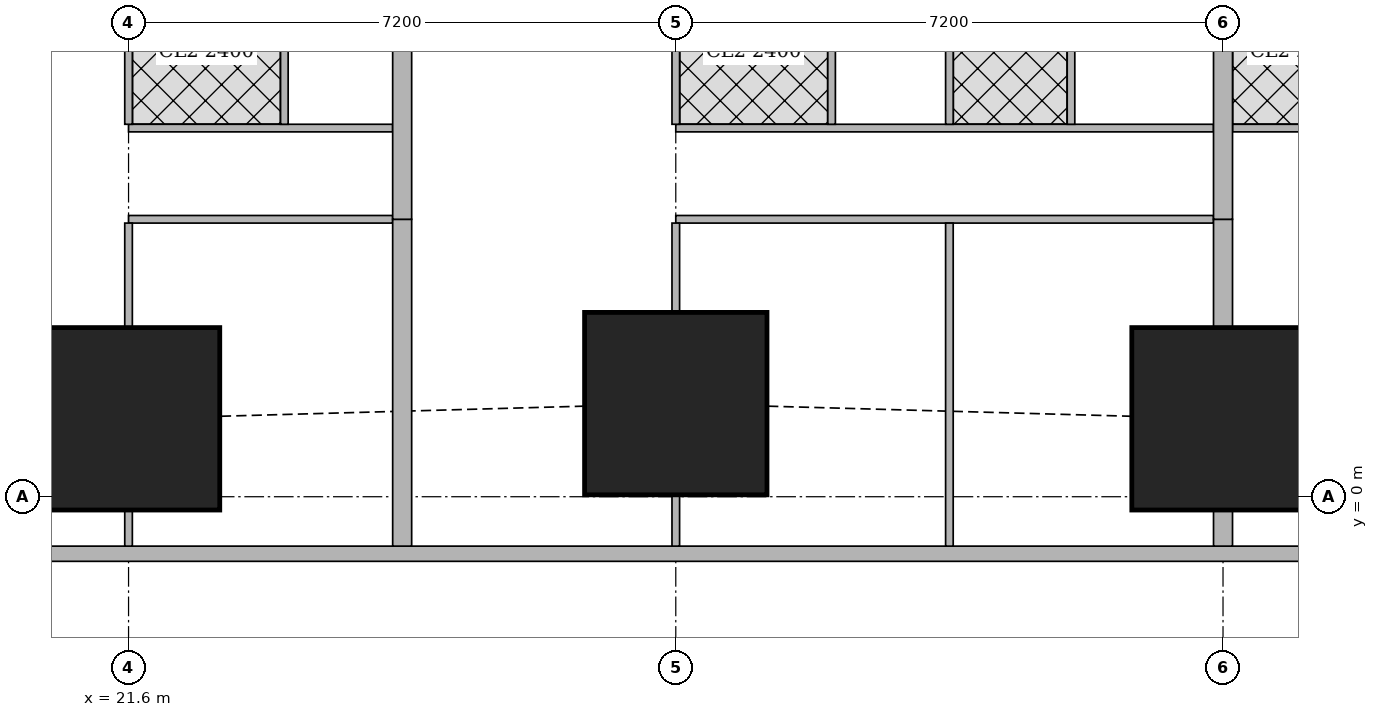
"""IFC4 building model, lengths in metres.
Left out: names, types, materials, properties, quantities, classifications, styles, units other than length and angle.
Written with IfcOpenShell. Run it as: python <this file> out.ifc"""

import sys

from ifc_helpers import new_model, si_unit, direction, frame, frame_2d, origin, origin_2d, place, context, subcontext, project, spatial, rectangle, extrude, element, fill, save


model = new_model("IFC4")
c1 = context("Model", 3, precision=1e-05, world=origin(), true_north=direction((0.0, 1.0)))
c2 = subcontext(c1, "Body", "Model", "MODEL_VIEW")
j1 = project(units=[si_unit("LENGTHUNIT", "METRE"), si_unit("PLANEANGLEUNIT", "RADIAN")], contexts=[c1])
p1 = place(None, origin())
s1 = spatial("IfcSite", under=j1, at=p1, CompositionType="ELEMENT")
p2 = place(p1, origin())
s2 = spatial("IfcBuilding", under=s1, at=p2, CompositionType="ELEMENT")
p3 = place(p2, frame((0.0, 0.0, 204.95)))
s3 = spatial("IfcBuildingStorey", under=s2, at=p3, CompositionType="ELEMENT", Elevation=204.95)
for number, where, z_axis, x_axis in (
    (1, (21.6, 1.025, 0.0), (0.0, 0.0, 1.0), (1.0, 0.0, 0.0)),
    (2, (28.8, 1.225, 0.0), (0.0, 0.0, 1.0), (1.0, 0.0, 0.0)),
    (3, (36.0, 1.025, 0.0), (0.0, 0.0, 1.0), (1.0, 0.0, 0.0)),
):
    element("IfcColumn", number, at=place(p3, frame(where, z_axis=z_axis, x_axis=x_axis)), inside=s3, PredefinedType="COLUMN", context=c2, shape_type="SweptSolid", body=[
        extrude(rectangle(XDim=2.4, YDim=2.4, at=origin_2d()), origin(), (0.0, 0.0, 1.0), 3.75),
    ])
p4 = place(p3, frame((7.363, -0.75, 0.0), z_axis=(0.0, 0.0, 1.0), x_axis=(1.0, 0.0, 0.0)))
e4 = element("IfcWall", 4, at=p4, inside=s3, PredefinedType="SOLIDWALL", context=c2, shape_type="SweptSolid", body=[
    extrude(rectangle(XDim=40.428, YDim=0.2, at=frame_2d((20.214, 0.0))), origin(), (0.0, 0.0, 1.0), 3.5),
])
p5 = place(p4, frame((2.319, 0.0, 0.9)))
e5 = element("IfcOpeningElement", 5, at=p5, cuts=e4, PredefinedType="OPENING", context=c2, shape_type="SweptSolid", body=[
    extrude(rectangle(XDim=2.4, YDim=1.5, at=frame_2d((1.2, 0.75))), frame((0.0, 0.11, 0.0), z_axis=(0.0, -1.0, 0.0), x_axis=(1.0, 0.0, 0.0)), (0.0, 0.0, 1.0), 0.22),
])
p6 = place(p4, frame((7.937, 0.0, 0.9)))
e6 = element("IfcOpeningElement", 6, at=p6, cuts=e4, PredefinedType="OPENING", context=c2, shape_type="SweptSolid", body=[
    extrude(rectangle(XDim=1.8, YDim=1.5, at=frame_2d((0.9, 0.75))), frame((0.0, 0.11, 0.0), z_axis=(0.0, -1.0, 0.0), x_axis=(1.0, 0.0, 0.0)), (0.0, 0.0, 1.0), 0.22),
])
p7 = place(p4, frame((11.537, 0.0, 0.9)))
e7 = element("IfcOpeningElement", 7, at=p7, cuts=e4, PredefinedType="OPENING", context=c2, shape_type="SweptSolid", body=[
    extrude(rectangle(XDim=1.8, YDim=1.5, at=frame_2d((0.9, 0.75))), frame((0.0, 0.11, 0.0), z_axis=(0.0, -1.0, 0.0), x_axis=(1.0, 0.0, 0.0)), (0.0, 0.0, 1.0), 0.22),
])
p8 = place(p4, frame((15.137, 0.0, 0.9)))
e8 = element("IfcOpeningElement", 8, at=p8, cuts=e4, PredefinedType="OPENING", context=c2, shape_type="SweptSolid", body=[
    extrude(rectangle(XDim=1.8, YDim=1.5, at=frame_2d((0.9, 0.75))), frame((0.0, 0.11, 0.0), z_axis=(0.0, -1.0, 0.0), x_axis=(1.0, 0.0, 0.0)), (0.0, 0.0, 1.0), 0.22),
])
p9 = place(p4, frame((18.737, 0.0, 0.9)))
e9 = element("IfcOpeningElement", 9, at=p9, cuts=e4, PredefinedType="OPENING", context=c2, shape_type="SweptSolid", body=[
    extrude(rectangle(XDim=1.8, YDim=1.5, at=frame_2d((0.9, 0.75))), frame((0.0, 0.11, 0.0), z_axis=(0.0, -1.0, 0.0), x_axis=(1.0, 0.0, 0.0)), (0.0, 0.0, 1.0), 0.22),
])
p10 = place(p4, frame((22.337, 0.0, 0.9)))
e10 = element("IfcOpeningElement", 10, at=p10, cuts=e4, PredefinedType="OPENING", context=c2, shape_type="SweptSolid", body=[
    extrude(rectangle(XDim=1.8, YDim=1.5, at=frame_2d((0.9, 0.75))), frame((0.0, 0.11, 0.0), z_axis=(0.0, -1.0, 0.0), x_axis=(1.0, 0.0, 0.0)), (0.0, 0.0, 1.0), 0.22),
])
p11 = place(p4, frame((25.937, 0.0, 0.9)))
e11 = element("IfcOpeningElement", 11, at=p11, cuts=e4, PredefinedType="OPENING", context=c2, shape_type="SweptSolid", body=[
    extrude(rectangle(XDim=1.8, YDim=1.5, at=frame_2d((0.9, 0.75))), frame((0.0, 0.11, 0.0), z_axis=(0.0, -1.0, 0.0), x_axis=(1.0, 0.0, 0.0)), (0.0, 0.0, 1.0), 0.22),
])
p12 = place(p4, frame((29.537, 0.0, 0.9)))
e12 = element("IfcOpeningElement", 12, at=p12, cuts=e4, PredefinedType="OPENING", context=c2, shape_type="SweptSolid", body=[
    extrude(rectangle(XDim=1.8, YDim=1.5, at=frame_2d((0.9, 0.75))), frame((0.0, 0.11, 0.0), z_axis=(0.0, -1.0, 0.0), x_axis=(1.0, 0.0, 0.0)), (0.0, 0.0, 1.0), 0.22),
])
p13 = place(p3, frame((33.68, 42.723, 0.0), z_axis=(0.0, 0.0, 1.0), x_axis=(0.185601160014, -0.982625162207, 0.0)))
e13 = element("IfcWall", 13, at=p13, inside=s3, PredefinedType="SOLIDWALL", context=c2, shape_type="SweptSolid", body=[
    extrude(rectangle(XDim=41.051, YDim=0.15, at=frame_2d((20.526, 0.0))), origin(), (0.0, 0.0, 1.0), 2.5),
])
p14 = place(p13, frame((12.307, 0.0, 0.0)))
e14 = element("IfcOpeningElement", 14, at=p14, cuts=e13, PredefinedType="OPENING", context=c2, shape_type="SweptSolid", body=[
    extrude(rectangle(XDim=1.0, YDim=2.1, at=frame_2d((0.5, 1.05))), frame((0.0, 0.085, 0.0), z_axis=(0.0, -1.0, 0.0), x_axis=(1.0, 0.0, 0.0)), (0.0, 0.0, 1.0), 0.17),
])
p15 = place(p13, frame((16.123, 0.0, 0.0)))
e15 = element("IfcOpeningElement", 15, at=p15, cuts=e13, PredefinedType="OPENING", context=c2, shape_type="SweptSolid", body=[
    extrude(rectangle(XDim=1.0, YDim=2.1, at=frame_2d((0.5, 1.05))), frame((0.0, 0.085, 0.0), z_axis=(0.0, -1.0, 0.0), x_axis=(1.0, 0.0, 0.0)), (0.0, 0.0, 1.0), 0.17),
])
p16 = place(p13, frame((30.902, 0.0, 0.0)))
e16 = element("IfcOpeningElement", 16, at=p16, cuts=e13, PredefinedType="OPENING", context=c2, shape_type="SweptSolid", body=[
    extrude(rectangle(XDim=1.0, YDim=2.1, at=frame_2d((0.5, 1.05))), frame((0.0, 0.085, 0.0), z_axis=(0.0, -1.0, 0.0), x_axis=(1.0, 0.0, 0.0)), (0.0, 0.0, 1.0), 0.17),
])
p17 = place(p3, frame((25.075, 3.65, 0.0), z_axis=(0.0, 0.0, 1.0), x_axis=(-1.0, 0.0, 0.0)))
e17 = element("IfcWall", 17, at=p17, inside=s3, PredefinedType="PARTITIONING", context=c2, shape_type="SweptSolid", body=[
    extrude(rectangle(XDim=3.475, YDim=0.1, at=frame_2d((1.737, 0.0))), origin(), (0.0, 0.0, 1.0), 3.5),
])
p18 = place(p17, frame((2.375, 0.0, 0.0)))
e18 = element("IfcOpeningElement", 18, at=p18, cuts=e17, PredefinedType="OPENING", context=c2, shape_type="SweptSolid", body=[
    extrude(rectangle(XDim=0.9, YDim=2.1, at=frame_2d((0.45, 1.05))), frame((0.0, 0.06, 0.0), z_axis=(0.0, -1.0, 0.0), x_axis=(1.0, 0.0, 0.0)), (0.0, 0.0, 1.0), 0.12),
])
p19 = place(p3, frame((25.075, 4.85, 0.0), z_axis=(0.0, 0.0, 1.0), x_axis=(-1.0, 0.0, 0.0)))
e19 = element("IfcWall", 19, at=p19, inside=s3, PredefinedType="PARTITIONING", context=c2, shape_type="SweptSolid", body=[
    extrude(rectangle(XDim=3.475, YDim=0.1, at=frame_2d((1.737, 0.0))), origin(), (0.0, 0.0, 1.0), 3.5),
])
p20 = place(p19, frame((2.0, 0.0, 0.0)))
e20 = element("IfcOpeningElement", 20, at=p20, cuts=e19, PredefinedType="OPENING", context=c2, shape_type="SweptSolid", body=[
    extrude(rectangle(XDim=0.9, YDim=2.1, at=frame_2d((0.45, 1.05))), frame((0.0, 0.06, 0.0), z_axis=(0.0, -1.0, 0.0), x_axis=(1.0, 0.0, 0.0)), (0.0, 0.0, 1.0), 0.12),
])
p21 = place(p19, frame((0.2, 0.0, 0.0)))
e21 = element("IfcOpeningElement", 21, at=p21, cuts=e19, PredefinedType="OPENING", context=c2, shape_type="SweptSolid", body=[
    extrude(rectangle(XDim=0.9, YDim=2.1, at=frame_2d((0.45, 1.05))), frame((0.0, 0.06, 0.0), z_axis=(0.0, -1.0, 0.0), x_axis=(1.0, 0.0, 0.0)), (0.0, 0.0, 1.0), 0.12),
])
p22 = place(p3, frame((21.6, -0.65, 0.0), z_axis=(0.0, 0.0, 1.0), x_axis=(0.0, 1.0, 0.0)))
e22 = element("IfcWall", 22, at=p22, inside=s3, PredefinedType="PARTITIONING", context=c2, shape_type="SweptSolid", body=[
    extrude(rectangle(XDim=0.474, YDim=0.1, at=frame_2d((0.237, 0.0))), origin(), (0.0, 0.0, 1.0), 3.5),
])
p23 = place(p3, frame((21.6, 2.226, 0.0), z_axis=(0.0, 0.0, 1.0), x_axis=(0.0, 1.0, 0.0)))
e23 = element("IfcWall", 23, at=p23, inside=s3, PredefinedType="PARTITIONING", context=c2, shape_type="SweptSolid", body=[
    extrude(rectangle(XDim=1.374, YDim=0.1, at=frame_2d((0.687, 0.0))), origin(), (0.0, 0.0, 1.0), 3.5),
])
p24 = place(p3, frame((21.6, 4.9, 0.0), z_axis=(0.0, 0.0, 1.0), x_axis=(0.0, 1.0, 0.0)))
e24 = element("IfcWall", 24, at=p24, inside=s3, PredefinedType="PARTITIONING", context=c2, shape_type="SweptSolid", body=[
    extrude(rectangle(XDim=1.899, YDim=0.1, at=frame_2d((0.95, 0.0))), origin(), (0.0, 0.0, 1.0), 3.5),
])
p25 = place(p3, frame((23.65, 4.9, 0.0), z_axis=(0.0, 0.0, 1.0), x_axis=(0.0, 1.0, 0.0)))
e25 = element("IfcWall", 25, at=p25, inside=s3, PredefinedType="PARTITIONING", context=c2, shape_type="SweptSolid", body=[
    extrude(rectangle(XDim=3.525, YDim=0.1, at=frame_2d((1.763, 0.0))), origin(), (0.0, 0.0, 1.0), 3.5),
])
p26 = place(p3, frame((35.875, 3.65, 0.0), z_axis=(0.0, 0.0, 1.0), x_axis=(-1.0, 0.0, 0.0)))
e26 = element("IfcWall", 26, at=p26, inside=s3, PredefinedType="PARTITIONING", context=c2, shape_type="SweptSolid", body=[
    extrude(rectangle(XDim=7.075, YDim=0.1, at=frame_2d((3.538, 0.0))), origin(), (0.0, 0.0, 1.0), 3.5),
])
p27 = place(p26, frame((4.95, 0.0, 0.0)))
e27 = element("IfcOpeningElement", 27, at=p27, cuts=e26, PredefinedType="OPENING", context=c2, shape_type="SweptSolid", body=[
    extrude(rectangle(XDim=0.9, YDim=2.1, at=frame_2d((0.45, 1.05))), frame((0.0, 0.06, 0.0), z_axis=(0.0, -1.0, 0.0), x_axis=(1.0, 0.0, 0.0)), (0.0, 0.0, 1.0), 0.12),
])
p28 = place(p26, frame((2.375, 0.0, 0.0)))
e28 = element("IfcOpeningElement", 28, at=p28, cuts=e26, PredefinedType="OPENING", context=c2, shape_type="SweptSolid", body=[
    extrude(rectangle(XDim=0.9, YDim=2.1, at=frame_2d((0.45, 1.05))), frame((0.0, 0.06, 0.0), z_axis=(0.0, -1.0, 0.0), x_axis=(1.0, 0.0, 0.0)), (0.0, 0.0, 1.0), 0.12),
])
p29 = place(p3, frame((35.875, 4.85, 0.0), z_axis=(0.0, 0.0, 1.0), x_axis=(-1.0, 0.0, 0.0)))
e29 = element("IfcWall", 29, at=p29, inside=s3, PredefinedType="PARTITIONING", context=c2, shape_type="SweptSolid", body=[
    extrude(rectangle(XDim=7.075, YDim=0.1, at=frame_2d((3.538, 0.0))), origin(), (0.0, 0.0, 1.0), 3.5),
])
p30 = place(p29, frame((5.6, 0.0, 0.0)))
e30 = element("IfcOpeningElement", 30, at=p30, cuts=e29, PredefinedType="OPENING", context=c2, shape_type="SweptSolid", body=[
    extrude(rectangle(XDim=0.9, YDim=2.1, at=frame_2d((0.45, 1.05))), frame((0.0, 0.06, 0.0), z_axis=(0.0, -1.0, 0.0), x_axis=(1.0, 0.0, 0.0)), (0.0, 0.0, 1.0), 0.12),
])
p31 = place(p29, frame((2.225, 0.0, 0.0)))
e31 = element("IfcOpeningElement", 31, at=p31, cuts=e29, PredefinedType="OPENING", context=c2, shape_type="SweptSolid", body=[
    extrude(rectangle(XDim=0.9, YDim=2.1, at=frame_2d((0.45, 1.05))), frame((0.0, 0.06, 0.0), z_axis=(0.0, -1.0, 0.0), x_axis=(1.0, 0.0, 0.0)), (0.0, 0.0, 1.0), 0.12),
])
p32 = place(p29, frame((3.8, 0.0, 0.0)))
e32 = element("IfcOpeningElement", 32, at=p32, cuts=e29, PredefinedType="OPENING", context=c2, shape_type="SweptSolid", body=[
    extrude(rectangle(XDim=0.9, YDim=2.1, at=frame_2d((0.45, 1.05))), frame((0.0, 0.06, 0.0), z_axis=(0.0, -1.0, 0.0), x_axis=(1.0, 0.0, 0.0)), (0.0, 0.0, 1.0), 0.12),
])
p33 = place(p29, frame((0.425, 0.0, 0.0)))
e33 = element("IfcOpeningElement", 33, at=p33, cuts=e29, PredefinedType="OPENING", context=c2, shape_type="SweptSolid", body=[
    extrude(rectangle(XDim=0.9, YDim=2.1, at=frame_2d((0.45, 1.05))), frame((0.0, 0.06, 0.0), z_axis=(0.0, -1.0, 0.0), x_axis=(1.0, 0.0, 0.0)), (0.0, 0.0, 1.0), 0.12),
])
p34 = place(p3, frame((28.8, -0.65, 0.0), z_axis=(0.0, 0.0, 1.0), x_axis=(0.0, 1.0, 0.0)))
e34 = element("IfcWall", 34, at=p34, inside=s3, PredefinedType="PARTITIONING", context=c2, shape_type="SweptSolid", body=[
    extrude(rectangle(XDim=0.674, YDim=0.1, at=frame_2d((0.337, 0.0))), origin(), (0.0, 0.0, 1.0), 3.5),
])
p35 = place(p3, frame((28.8, 2.426, 0.0), z_axis=(0.0, 0.0, 1.0), x_axis=(0.0, 1.0, 0.0)))
e35 = element("IfcWall", 35, at=p35, inside=s3, PredefinedType="PARTITIONING", context=c2, shape_type="SweptSolid", body=[
    extrude(rectangle(XDim=1.174, YDim=0.1, at=frame_2d((0.587, 0.0))), origin(), (0.0, 0.0, 1.0), 3.5),
])
p36 = place(p3, frame((32.4, -0.65, 0.0), z_axis=(0.0, 0.0, 1.0), x_axis=(0.0, 1.0, 0.0)))
e36 = element("IfcWall", 36, at=p36, inside=s3, PredefinedType="PARTITIONING", context=c2, shape_type="SweptSolid", body=[
    extrude(rectangle(XDim=4.25, YDim=0.1, at=frame_2d((2.125, 0.0))), origin(), (0.0, 0.0, 1.0), 2.05),
])
p37 = place(p3, frame((28.8, 4.9, 0.0), z_axis=(0.0, 0.0, 1.0), x_axis=(0.0, 1.0, 0.0)))
e37 = element("IfcWall", 37, at=p37, inside=s3, PredefinedType="PARTITIONING", context=c2, shape_type="SweptSolid", body=[
    extrude(rectangle(XDim=1.899, YDim=0.1, at=frame_2d((0.95, 0.0))), origin(), (0.0, 0.0, 1.0), 3.5),
])
for number, where, z_axis, x_axis in (
    (38, (32.4, 4.9, 0.0), (0.0, 0.0, 1.0), (0.0, 1.0, 0.0)),
    (39, (30.85, 4.9, 0.0), (0.0, 0.0, 1.0), (0.0, 1.0, 0.0)),
    (40, (34.0, 4.9, 0.0), (0.0, 0.0, 1.0), (0.0, 1.0, 0.0)),
):
    element("IfcWall", number, at=place(p3, frame(where, z_axis=z_axis, x_axis=x_axis)), inside=s3, PredefinedType="PARTITIONING", context=c2, shape_type="SweptSolid", body=[
        extrude(rectangle(XDim=3.525, YDim=0.1, at=frame_2d((1.763, 0.0))), origin(), (0.0, 0.0, 1.0), 3.5),
    ])
p38 = place(p3, frame((25.2, -0.65, 0.0), z_axis=(0.0, 0.0, 1.0), x_axis=(0.0, 1.0, 0.0)))
e41 = element("IfcWall", 41, at=p38, inside=s3, PredefinedType="SOLIDWALL", context=c2, shape_type="SweptSolid", body=[
    extrude(rectangle(XDim=4.3, YDim=0.25, at=frame_2d((2.15, 0.0))), origin(), (0.0, 0.0, 1.0), 2.05),
])
p39 = place(p3, frame((25.2, 3.65, 0.0), z_axis=(0.0, 0.0, 1.0), x_axis=(0.0, 1.0, 0.0)))
e42 = element("IfcWall", 42, at=p39, inside=s3, PredefinedType="SOLIDWALL", context=c2, shape_type="SweptSolid", body=[
    extrude(rectangle(XDim=4.775, YDim=0.25, at=frame_2d((2.388, 0.0))), origin(), (0.0, 0.0, 1.0), 3.5),
])
p40 = place(p3, frame((37.89, 4.85, 0.0), z_axis=(0.0, 0.0, 1.0), x_axis=(-1.0, 0.0, 0.0)))
e43 = element("IfcWall", 43, at=p40, inside=s3, PredefinedType="PARTITIONING", context=c2, shape_type="SweptSolid", body=[
    extrude(rectangle(XDim=1.765, YDim=0.1, at=frame_2d((0.882, 0.0))), origin(), (0.0, 0.0, 1.0), 3.5),
])
p41 = place(p40, frame((0.49, 0.0, 0.0)))
e44 = element("IfcOpeningElement", 44, at=p41, cuts=e43, PredefinedType="OPENING", context=c2, shape_type="SweptSolid", body=[
    extrude(rectangle(XDim=0.9, YDim=2.1, at=frame_2d((0.45, 1.05))), frame((0.0, 0.06, 0.0), z_axis=(0.0, -1.0, 0.0), x_axis=(1.0, 0.0, 0.0)), (0.0, 0.0, 1.0), 0.12),
])
p42 = place(p3, frame((36.0, -0.65, 0.0), z_axis=(0.0, 0.0, 1.0), x_axis=(0.0, 1.0, 0.0)))
e45 = element("IfcWall", 45, at=p42, inside=s3, PredefinedType="SOLIDWALL", context=c2, shape_type="SweptSolid", body=[
    extrude(rectangle(XDim=0.474, YDim=0.25, at=frame_2d((0.237, 0.0))), origin(), (0.0, 0.0, 1.0), 2.05),
])
p43 = place(p3, frame((36.0, 2.226, 0.0), z_axis=(0.0, 0.0, 1.0), x_axis=(0.0, 1.0, 0.0)))
e46 = element("IfcWall", 46, at=p43, inside=s3, PredefinedType="SOLIDWALL", context=c2, shape_type="SweptSolid", body=[
    extrude(rectangle(XDim=1.424, YDim=0.25, at=frame_2d((0.712, 0.0))), origin(), (0.0, 0.0, 1.0), 2.05),
])
p44 = place(p3, frame((36.0, 3.65, 0.0), z_axis=(0.0, 0.0, 1.0), x_axis=(0.0, 1.0, 0.0)))
e47 = element("IfcWall", 47, at=p44, inside=s3, PredefinedType="SOLIDWALL", context=c2, shape_type="SweptSolid", body=[
    extrude(rectangle(XDim=3.149, YDim=0.25, at=frame_2d((1.575, 0.0))), origin(), (0.0, 0.0, 1.0), 3.5),
])
p45 = place(p7, origin())
e48 = element("IfcWindow", 48, at=p45, inside=s3, PartitioningType="SINGLE_PANEL", PredefinedType="WINDOW", context=c2, shape_type="SweptSolid", body=[
    extrude(rectangle(XDim=1.8, YDim=1.5, at=frame_2d((0.9, 0.75))), frame((0.0, 0.03, 0.0), z_axis=(0.0, -1.0, 0.0), x_axis=(1.0, 0.0, 0.0)), (0.0, 0.0, 1.0), 0.06),
])
fill(e7, e48)
p46 = place(p8, origin())
e49 = element("IfcWindow", 49, at=p46, inside=s3, PartitioningType="SINGLE_PANEL", PredefinedType="WINDOW", context=c2, shape_type="SweptSolid", body=[
    extrude(rectangle(XDim=1.8, YDim=1.5, at=frame_2d((0.9, 0.75))), frame((0.0, 0.03, 0.0), z_axis=(0.0, -1.0, 0.0), x_axis=(1.0, 0.0, 0.0)), (0.0, 0.0, 1.0), 0.06),
])
fill(e8, e49)
p47 = place(p9, origin())
e50 = element("IfcWindow", 50, at=p47, inside=s3, PartitioningType="SINGLE_PANEL", PredefinedType="WINDOW", context=c2, shape_type="SweptSolid", body=[
    extrude(rectangle(XDim=1.8, YDim=1.5, at=frame_2d((0.9, 0.75))), frame((0.0, 0.03, 0.0), z_axis=(0.0, -1.0, 0.0), x_axis=(1.0, 0.0, 0.0)), (0.0, 0.0, 1.0), 0.06),
])
fill(e9, e50)
p48 = place(p10, origin())
e51 = element("IfcWindow", 51, at=p48, inside=s3, PartitioningType="SINGLE_PANEL", PredefinedType="WINDOW", context=c2, shape_type="SweptSolid", body=[
    extrude(rectangle(XDim=1.8, YDim=1.5, at=frame_2d((0.9, 0.75))), frame((0.0, 0.03, 0.0), z_axis=(0.0, -1.0, 0.0), x_axis=(1.0, 0.0, 0.0)), (0.0, 0.0, 1.0), 0.06),
])
fill(e10, e51)
p49 = place(p11, origin())
e52 = element("IfcWindow", 52, at=p49, inside=s3, PartitioningType="SINGLE_PANEL", PredefinedType="WINDOW", context=c2, shape_type="SweptSolid", body=[
    extrude(rectangle(XDim=1.8, YDim=1.5, at=frame_2d((0.9, 0.75))), frame((0.0, 0.03, 0.0), z_axis=(0.0, -1.0, 0.0), x_axis=(1.0, 0.0, 0.0)), (0.0, 0.0, 1.0), 0.06),
])
fill(e11, e52)
p50 = place(p12, origin())
e53 = element("IfcWindow", 53, at=p50, inside=s3, PartitioningType="SINGLE_PANEL", PredefinedType="WINDOW", context=c2, shape_type="SweptSolid", body=[
    extrude(rectangle(XDim=1.8, YDim=1.5, at=frame_2d((0.9, 0.75))), frame((0.0, 0.03, 0.0), z_axis=(0.0, -1.0, 0.0), x_axis=(1.0, 0.0, 0.0)), (0.0, 0.0, 1.0), 0.06),
])
fill(e12, e53)
p51 = place(p18, origin())
e54 = element("IfcDoor", 54, at=p51, inside=s3, OperationType="SINGLE_SWING_RIGHT", PredefinedType="DOOR", context=c2, shape_type="SweptSolid", body=[
    extrude(rectangle(XDim=0.9, YDim=2.1, at=frame_2d((0.45, 1.05))), frame((0.0, 0.025, 0.0), z_axis=(0.0, -1.0, 0.0), x_axis=(1.0, 0.0, 0.0)), (0.0, 0.0, 1.0), 0.05),
])
fill(e18, e54)
p52 = place(p20, origin())
e55 = element("IfcDoor", 55, at=p52, inside=s3, OperationType="SINGLE_SWING_LEFT", PredefinedType="DOOR", context=c2, shape_type="SweptSolid", body=[
    extrude(rectangle(XDim=0.9, YDim=2.1, at=frame_2d((0.45, 1.05))), frame((0.0, 0.025, 0.0), z_axis=(0.0, -1.0, 0.0), x_axis=(1.0, 0.0, 0.0)), (0.0, 0.0, 1.0), 0.05),
])
fill(e20, e55)
p53 = place(p21, origin())
e56 = element("IfcDoor", 56, at=p53, inside=s3, OperationType="SINGLE_SWING_RIGHT", PredefinedType="DOOR", context=c2, shape_type="SweptSolid", body=[
    extrude(rectangle(XDim=0.9, YDim=2.1, at=frame_2d((0.45, 1.05))), frame((0.0, 0.025, 0.0), z_axis=(0.0, -1.0, 0.0), x_axis=(1.0, 0.0, 0.0)), (0.0, 0.0, 1.0), 0.05),
])
fill(e21, e56)
p54 = place(p27, origin())
e57 = element("IfcDoor", 57, at=p54, inside=s3, OperationType="SINGLE_SWING_RIGHT", PredefinedType="DOOR", context=c2, shape_type="SweptSolid", body=[
    extrude(rectangle(XDim=0.9, YDim=2.1, at=frame_2d((0.45, 1.05))), frame((0.0, 0.025, 0.0), z_axis=(0.0, -1.0, 0.0), x_axis=(1.0, 0.0, 0.0)), (0.0, 0.0, 1.0), 0.05),
])
fill(e27, e57)
p55 = place(p28, origin())
e58 = element("IfcDoor", 58, at=p55, inside=s3, OperationType="SINGLE_SWING_RIGHT", PredefinedType="DOOR", context=c2, shape_type="SweptSolid", body=[
    extrude(rectangle(XDim=0.9, YDim=2.1, at=frame_2d((0.45, 1.05))), frame((0.0, 0.025, 0.0), z_axis=(0.0, -1.0, 0.0), x_axis=(1.0, 0.0, 0.0)), (0.0, 0.0, 1.0), 0.05),
])
fill(e28, e58)
p56 = place(p30, origin())
e59 = element("IfcDoor", 59, at=p56, inside=s3, OperationType="SINGLE_SWING_LEFT", PredefinedType="DOOR", context=c2, shape_type="SweptSolid", body=[
    extrude(rectangle(XDim=0.9, YDim=2.1, at=frame_2d((0.45, 1.05))), frame((0.0, 0.025, 0.0), z_axis=(0.0, -1.0, 0.0), x_axis=(1.0, 0.0, 0.0)), (0.0, 0.0, 1.0), 0.05),
])
fill(e30, e59)
p57 = place(p31, origin())
e60 = element("IfcDoor", 60, at=p57, inside=s3, OperationType="SINGLE_SWING_LEFT", PredefinedType="DOOR", context=c2, shape_type="SweptSolid", body=[
    extrude(rectangle(XDim=0.9, YDim=2.1, at=frame_2d((0.45, 1.05))), frame((0.0, 0.025, 0.0), z_axis=(0.0, -1.0, 0.0), x_axis=(1.0, 0.0, 0.0)), (0.0, 0.0, 1.0), 0.05),
])
fill(e31, e60)
p58 = place(p32, origin())
e61 = element("IfcDoor", 61, at=p58, inside=s3, OperationType="SINGLE_SWING_LEFT", PredefinedType="DOOR", context=c2, shape_type="SweptSolid", body=[
    extrude(rectangle(XDim=0.9, YDim=2.1, at=frame_2d((0.45, 1.05))), frame((0.0, 0.025, 0.0), z_axis=(0.0, -1.0, 0.0), x_axis=(1.0, 0.0, 0.0)), (0.0, 0.0, 1.0), 0.05),
])
fill(e32, e61)
p59 = place(p33, origin())
e62 = element("IfcDoor", 62, at=p59, inside=s3, OperationType="SINGLE_SWING_RIGHT", PredefinedType="DOOR", context=c2, shape_type="SweptSolid", body=[
    extrude(rectangle(XDim=0.9, YDim=2.1, at=frame_2d((0.45, 1.05))), frame((0.0, 0.025, 0.0), z_axis=(0.0, -1.0, 0.0), x_axis=(1.0, 0.0, 0.0)), (0.0, 0.0, 1.0), 0.05),
])
fill(e33, e62)
p60 = place(p41, origin())
e63 = element("IfcDoor", 63, at=p60, inside=s3, OperationType="SINGLE_SWING_LEFT", PredefinedType="DOOR", context=c2, shape_type="SweptSolid", body=[
    extrude(rectangle(XDim=0.9, YDim=2.1, at=frame_2d((0.45, 1.05))), frame((0.0, 0.025, 0.0), z_axis=(0.0, -1.0, 0.0), x_axis=(1.0, 0.0, 0.0)), (0.0, 0.0, 1.0), 0.05),
])
fill(e44, e63)
save(model, sys.argv[1])
